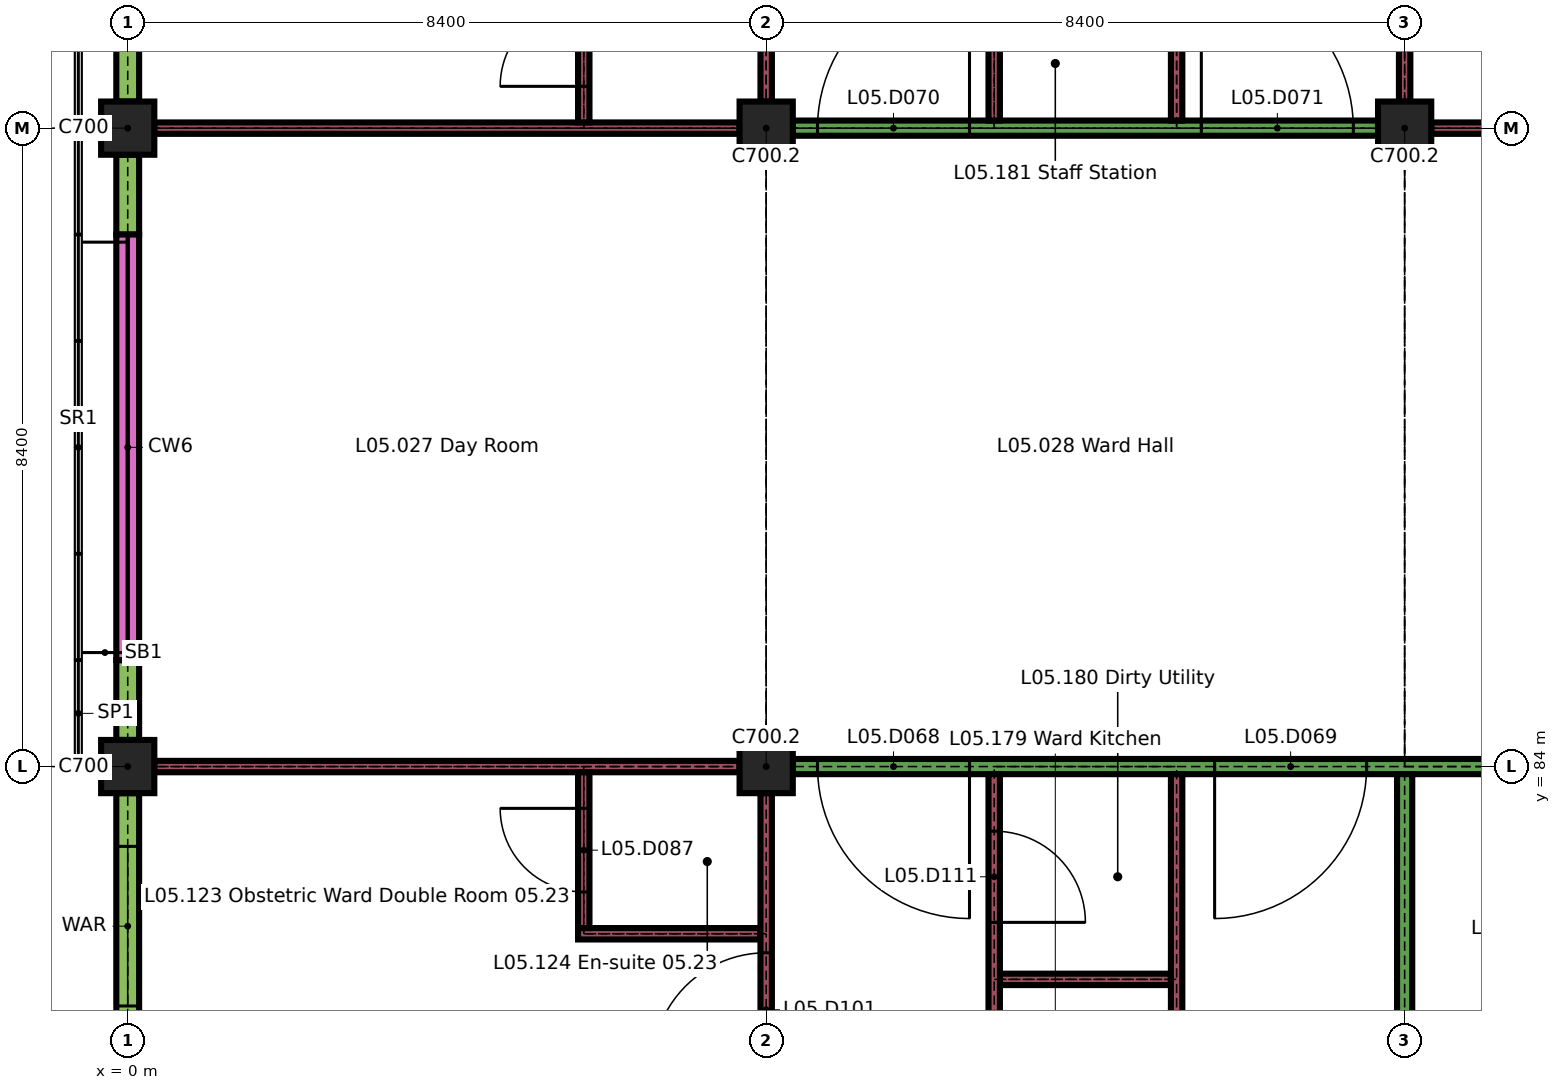
"""IFC4 building model, lengths in metres.
Left out: names, types, materials, properties, quantities, classifications, styles, units other than length and angle.
Written with IfcOpenShell. Run it as: python <this file> out.ifc"""

import sys

from ifc_helpers import new_model, si_unit, direction, frame, frame_2d, origin, origin_2d, place, context, subcontext, project, spatial, rectangle, extrude, element, fill, save


model = new_model("IFC4")
c1 = context("Model", 3, precision=1e-05, world=origin(), true_north=direction((0.0, 1.0)))
c2 = subcontext(c1, "Body", "Model", "MODEL_VIEW")
j1 = project(units=[si_unit("LENGTHUNIT", "METRE"), si_unit("PLANEANGLEUNIT", "RADIAN")], contexts=[c1])
p1 = place(None, origin())
s1 = spatial("IfcSite", under=j1, at=p1, CompositionType="ELEMENT")
p2 = place(p1, origin())
s2 = spatial("IfcBuilding", under=s1, at=p2, CompositionType="ELEMENT")
p3 = place(p2, frame((0.0, 0.0, 22.5)))
s3 = spatial("IfcBuildingStorey", under=s2, at=p3, CompositionType="ELEMENT", Elevation=22.5)
for number, where, z_axis, x_axis in (
    (1, (0.0, 84.0, 0.0), (0.0, 0.0, 1.0), (1.0, 0.0, 0.0)),
    (2, (8.4, 84.0, 0.0), (0.0, 0.0, 1.0), (1.0, 0.0, 0.0)),
    (3, (0.0, 92.4, 0.0), (0.0, 0.0, 1.0), (1.0, 0.0, 0.0)),
    (4, (8.4, 92.4, 0.0), (0.0, 0.0, 1.0), (1.0, 0.0, 0.0)),
    (5, (16.8, 92.4, 0.0), (0.0, 0.0, 1.0), (1.0, 0.0, 0.0)),
):
    element("IfcColumn", number, at=place(p3, frame(where, z_axis=z_axis, x_axis=x_axis)), inside=s3, PredefinedType="COLUMN", context=c2, shape_type="SweptSolid", body=[
        extrude(rectangle(XDim=0.7, YDim=0.7, at=origin_2d()), origin(), (0.0, 0.0, 1.0), 3.26),
    ])
p4 = place(p3, frame((0.0, 79.8, 0.0), z_axis=(0.0, 0.0, 1.0), x_axis=(0.0, 1.0, 0.0)))
e6 = element("IfcWall", 6, at=p4, inside=s3, PredefinedType="SOLIDWALL", context=c2, shape_type="SweptSolid", body=[
    extrude(rectangle(XDim=3.85, YDim=0.3, at=frame_2d((1.925, 0.0))), origin(), (0.0, 0.0, 1.0), 2.96),
])
p5 = place(p4, frame((1.05, 0.0, 0.9)))
e7 = element("IfcOpeningElement", 7, at=p5, cuts=e6, PredefinedType="OPENING", context=c2, shape_type="SweptSolid", body=[
    extrude(rectangle(XDim=2.1, YDim=1.5, at=frame_2d((1.05, 0.75))), frame((0.0, 0.16, 0.0), z_axis=(0.0, -1.0, 0.0), x_axis=(1.0, 0.0, 0.0)), (0.0, 0.0, 1.0), 0.32),
])
p6 = place(p3, frame((0.0, 84.35, 0.0), z_axis=(0.0, 0.0, 1.0), x_axis=(0.0, 1.0, 0.0)))
e8 = element("IfcWall", 8, at=p6, inside=s3, PredefinedType="SOLIDWALL", context=c2, shape_type="SweptSolid", body=[
    extrude(rectangle(XDim=1.05, YDim=0.3, at=frame_2d((0.525, 0.0))), origin(), (0.0, 0.0, 1.0), 2.96),
])
p7 = place(p3, frame((0.0, 91.0, 0.0), z_axis=(0.0, 0.0, 1.0), x_axis=(0.0, 1.0, 0.0)))
e9 = element("IfcWall", 9, at=p7, inside=s3, PredefinedType="SOLIDWALL", context=c2, shape_type="SweptSolid", body=[
    extrude(rectangle(XDim=1.05, YDim=0.3, at=frame_2d((0.525, 0.0))), origin(), (0.0, 0.0, 1.0), 2.96),
])
p8 = place(p3, frame((0.0, 85.4, 0.0), z_axis=(0.0, 0.0, 1.0), x_axis=(0.0, 1.0, 0.0)))
e10 = element("IfcWall", 10, at=p8, inside=s3, PredefinedType="SOLIDWALL", context=c2, shape_type="SweptSolid", body=[
    extrude(rectangle(XDim=5.6, YDim=0.3, at=frame_2d((2.8, 0.0))), origin(), (0.0, 0.0, 1.0), 0.6),
])
p9 = place(p3, frame((0.0, 92.75, 0.0), z_axis=(0.0, 0.0, 1.0), x_axis=(0.0, 1.0, 0.0)))
e11 = element("IfcWall", 11, at=p9, inside=s3, PredefinedType="SOLIDWALL", context=c2, shape_type="SweptSolid", body=[
    extrude(rectangle(XDim=3.85, YDim=0.3, at=frame_2d((1.925, 0.0))), origin(), (0.0, 0.0, 1.0), 2.96),
])
p10 = place(p9, frame((0.7, 0.0, 0.9)))
e12 = element("IfcOpeningElement", 12, at=p10, cuts=e11, PredefinedType="OPENING", context=c2, shape_type="SweptSolid", body=[
    extrude(rectangle(XDim=2.1, YDim=1.5, at=frame_2d((1.05, 0.75))), frame((0.0, 0.16, 0.0), z_axis=(0.0, -1.0, 0.0), x_axis=(1.0, 0.0, 0.0)), (0.0, 0.0, 1.0), 0.32),
])
p11 = place(p3, frame((11.475, 81.2, 0.0), z_axis=(0.0, 0.0, 1.0), x_axis=(1.0, 0.0, 0.0)))
e13 = element("IfcWall", 13, at=p11, inside=s3, PredefinedType="PARTITIONING", context=c2, shape_type="SweptSolid", body=[
    extrude(rectangle(XDim=2.25, YDim=0.15, at=frame_2d((1.125, 0.0))), origin(), (0.0, 0.0, 1.0), 3.26),
])
p12 = place(p3, frame((5.925, 81.8, 0.0), z_axis=(0.0, 0.0, 1.0), x_axis=(1.0, 0.0, 0.0)))
e14 = element("IfcWall", 14, at=p12, inside=s3, PredefinedType="PARTITIONING", context=c2, shape_type="SweptSolid", body=[
    extrude(rectangle(XDim=2.4, YDim=0.15, at=frame_2d((1.2, 0.0))), origin(), (0.0, 0.0, 1.0), 3.26),
])
p13 = place(p3, frame((0.35, 84.0, 0.0), z_axis=(0.0, 0.0, 1.0), x_axis=(1.0, 0.0, 0.0)))
e15 = element("IfcWall", 15, at=p13, inside=s3, PredefinedType="PARTITIONING", context=c2, shape_type="SweptSolid", body=[
    extrude(rectangle(XDim=7.7, YDim=0.15, at=frame_2d((3.85, 0.0))), origin(), (0.0, 0.0, 1.0), 3.26),
])
p14 = place(p3, frame((8.75, 84.0, 0.0), z_axis=(0.0, 0.0, 1.0), x_axis=(1.0, 0.0, 0.0)))
e16 = element("IfcWall", 16, at=p14, inside=s3, PredefinedType="PARTITIONING", context=c2, shape_type="SweptSolid", body=[
    extrude(rectangle(XDim=12.85, YDim=0.2, at=frame_2d((6.425, 0.0))), origin(), (0.0, 0.0, 1.0), 3.26),
])
p15 = place(p14, frame((0.325, 0.0, 0.0)))
e17 = element("IfcOpeningElement", 17, at=p15, cuts=e16, PredefinedType="OPENING", context=c2, shape_type="SweptSolid", body=[
    extrude(rectangle(XDim=2.0, YDim=2.4, at=frame_2d((1.0, 1.2))), frame((0.0, 0.11, 0.0), z_axis=(0.0, -1.0, 0.0), x_axis=(1.0, 0.0, 0.0)), (0.0, 0.0, 1.0), 0.22),
])
p16 = place(p14, frame((5.55, 0.0, 0.0)))
e18 = element("IfcOpeningElement", 18, at=p16, cuts=e16, PredefinedType="OPENING", context=c2, shape_type="SweptSolid", body=[
    extrude(rectangle(XDim=2.0, YDim=2.4, at=frame_2d((1.0, 1.2))), frame((0.0, 0.11, 0.0), z_axis=(0.0, -1.0, 0.0), x_axis=(1.0, 0.0, 0.0)), (0.0, 0.0, 1.0), 0.22),
])
p17 = place(p3, frame((0.35, 92.4, 0.0), z_axis=(0.0, 0.0, 1.0), x_axis=(1.0, 0.0, 0.0)))
e19 = element("IfcWall", 19, at=p17, inside=s3, PredefinedType="PARTITIONING", context=c2, shape_type="SweptSolid", body=[
    extrude(rectangle(XDim=7.7, YDim=0.15, at=frame_2d((3.85, 0.0))), origin(), (0.0, 0.0, 1.0), 3.26),
])
p18 = place(p3, frame((8.75, 92.4, 0.0), z_axis=(0.0, 0.0, 1.0), x_axis=(1.0, 0.0, 0.0)))
e20 = element("IfcWall", 20, at=p18, inside=s3, PredefinedType="PARTITIONING", context=c2, shape_type="SweptSolid", body=[
    extrude(rectangle(XDim=7.7, YDim=0.2, at=frame_2d((3.85, 0.0))), origin(), (0.0, 0.0, 1.0), 3.26),
])
p19 = place(p18, frame((0.325, 0.0, 0.0)))
e21 = element("IfcOpeningElement", 21, at=p19, cuts=e20, PredefinedType="OPENING", context=c2, shape_type="SweptSolid", body=[
    extrude(rectangle(XDim=2.0, YDim=2.4, at=frame_2d((1.0, 1.2))), frame((0.0, 0.11, 0.0), z_axis=(0.0, -1.0, 0.0), x_axis=(1.0, 0.0, 0.0)), (0.0, 0.0, 1.0), 0.22),
])
p20 = place(p18, frame((5.375, 0.0, 0.0)))
e22 = element("IfcOpeningElement", 22, at=p20, cuts=e20, PredefinedType="OPENING", context=c2, shape_type="SweptSolid", body=[
    extrude(rectangle(XDim=2.0, YDim=2.4, at=frame_2d((1.0, 1.2))), frame((0.0, 0.11, 0.0), z_axis=(0.0, -1.0, 0.0), x_axis=(1.0, 0.0, 0.0)), (0.0, 0.0, 1.0), 0.22),
])
p21 = place(p3, frame((17.15, 92.4, 0.0), z_axis=(0.0, 0.0, 1.0), x_axis=(1.0, 0.0, 0.0)))
e23 = element("IfcWall", 23, at=p21, inside=s3, PredefinedType="PARTITIONING", context=c2, shape_type="SweptSolid", body=[
    extrude(rectangle(XDim=7.7, YDim=0.15, at=frame_2d((3.85, 0.0))), origin(), (0.0, 0.0, 1.0), 3.26),
])
p22 = place(p3, frame((6.0, 81.875, 0.0), z_axis=(0.0, 0.0, 1.0), x_axis=(0.0, 1.0, 0.0)))
e24 = element("IfcWall", 24, at=p22, inside=s3, PredefinedType="PARTITIONING", context=c2, shape_type="SweptSolid", body=[
    extrude(rectangle(XDim=2.05, YDim=0.15, at=frame_2d((1.025, 0.0))), origin(), (0.0, 0.0, 1.0), 3.26),
])
p23 = place(p22, frame((0.475, 0.0, 0.0)))
e25 = element("IfcOpeningElement", 25, at=p23, cuts=e24, PredefinedType="OPENING", context=c2, shape_type="SweptSolid", body=[
    extrude(rectangle(XDim=1.1, YDim=2.1, at=frame_2d((0.55, 1.05))), frame((0.0, 0.085, 0.0), z_axis=(0.0, -1.0, 0.0), x_axis=(1.0, 0.0, 0.0)), (0.0, 0.0, 1.0), 0.17),
])
p24 = place(p3, frame((6.0, 92.475, 0.0), z_axis=(0.0, 0.0, 1.0), x_axis=(0.0, 1.0, 0.0)))
e26 = element("IfcWall", 26, at=p24, inside=s3, PredefinedType="PARTITIONING", context=c2, shape_type="SweptSolid", body=[
    extrude(rectangle(XDim=2.05, YDim=0.15, at=frame_2d((1.025, 0.0))), origin(), (0.0, 0.0, 1.0), 3.26),
])
p25 = place(p24, frame((0.475, 0.0, 0.0)))
e27 = element("IfcOpeningElement", 27, at=p25, cuts=e26, PredefinedType="OPENING", context=c2, shape_type="SweptSolid", body=[
    extrude(rectangle(XDim=1.1, YDim=2.1, at=frame_2d((0.55, 1.05))), frame((0.0, 0.085, 0.0), z_axis=(0.0, -1.0, 0.0), x_axis=(1.0, 0.0, 0.0)), (0.0, 0.0, 1.0), 0.17),
])
p26 = place(p3, frame((8.4, 75.6, 0.0), z_axis=(0.0, 0.0, 1.0), x_axis=(0.0, 1.0, 0.0)))
e28 = element("IfcWall", 28, at=p26, inside=s3, PredefinedType="PARTITIONING", context=c2, shape_type="SweptSolid", body=[
    extrude(rectangle(XDim=8.05, YDim=0.15, at=frame_2d((4.025, 0.0))), origin(), (0.0, 0.0, 1.0), 3.26),
])
p27 = place(p26, frame((2.45, 0.0, 0.0)))
e29 = element("IfcOpeningElement", 29, at=p27, cuts=e28, PredefinedType="OPENING", context=c2, shape_type="SweptSolid", body=[
    extrude(rectangle(XDim=1.5, YDim=2.4, at=frame_2d((0.75, 1.2))), frame((0.0, 0.085, 0.0), z_axis=(0.0, -1.0, 0.0), x_axis=(1.0, 0.0, 0.0)), (0.0, 0.0, 1.0), 0.17),
])
p28 = place(p26, frame((4.45, 0.0, 0.0)))
e30 = element("IfcOpeningElement", 30, at=p28, cuts=e28, PredefinedType="OPENING", context=c2, shape_type="SweptSolid", body=[
    extrude(rectangle(XDim=1.5, YDim=2.4, at=frame_2d((0.75, 1.2))), frame((0.0, 0.085, 0.0), z_axis=(0.0, -1.0, 0.0), x_axis=(1.0, 0.0, 0.0)), (0.0, 0.0, 1.0), 0.17),
])
p29 = place(p3, frame((8.4, 92.75, 0.0), z_axis=(0.0, 0.0, 1.0), x_axis=(0.0, 1.0, 0.0)))
e31 = element("IfcWall", 31, at=p29, inside=s3, PredefinedType="PARTITIONING", context=c2, shape_type="SweptSolid", body=[
    extrude(rectangle(XDim=7.7, YDim=0.15, at=frame_2d((3.85, 0.0))), origin(), (0.0, 0.0, 1.0), 3.26),
])
p30 = place(p29, frame((2.1, 0.0, 0.0)))
e32 = element("IfcOpeningElement", 32, at=p30, cuts=e31, PredefinedType="OPENING", context=c2, shape_type="SweptSolid", body=[
    extrude(rectangle(XDim=1.5, YDim=2.4, at=frame_2d((0.75, 1.2))), frame((0.0, 0.085, 0.0), z_axis=(0.0, -1.0, 0.0), x_axis=(1.0, 0.0, 0.0)), (0.0, 0.0, 1.0), 0.17),
])
p31 = place(p29, frame((4.1, 0.0, 0.0)))
e33 = element("IfcOpeningElement", 33, at=p31, cuts=e31, PredefinedType="OPENING", context=c2, shape_type="SweptSolid", body=[
    extrude(rectangle(XDim=1.5, YDim=2.4, at=frame_2d((0.75, 1.2))), frame((0.0, 0.085, 0.0), z_axis=(0.0, -1.0, 0.0), x_axis=(1.0, 0.0, 0.0)), (0.0, 0.0, 1.0), 0.17),
])
p32 = place(p3, frame((11.4, 77.075, 0.0), z_axis=(0.0, 0.0, 1.0), x_axis=(0.0, 1.0, 0.0)))
e34 = element("IfcWall", 34, at=p32, inside=s3, PredefinedType="PARTITIONING", context=c2, shape_type="SweptSolid", body=[
    extrude(rectangle(XDim=6.825, YDim=0.15, at=frame_2d((3.413, 0.0))), origin(), (0.0, 0.0, 1.0), 3.26),
])
p33 = place(p32, frame((4.875, 0.0, 0.0)))
e35 = element("IfcOpeningElement", 35, at=p33, cuts=e34, PredefinedType="OPENING", context=c2, shape_type="SweptSolid", body=[
    extrude(rectangle(XDim=1.2, YDim=2.1, at=frame_2d((0.6, 1.05))), frame((0.0, 0.085, 0.0), z_axis=(0.0, -1.0, 0.0), x_axis=(1.0, 0.0, 0.0)), (0.0, 0.0, 1.0), 0.17),
])
p34 = place(p3, frame((11.4, 92.5, 0.0), z_axis=(0.0, 0.0, 1.0), x_axis=(0.0, 1.0, 0.0)))
e36 = element("IfcWall", 36, at=p34, inside=s3, PredefinedType="PARTITIONING", context=c2, shape_type="SweptSolid", body=[
    extrude(rectangle(XDim=13.625, YDim=0.15, at=frame_2d((6.812, 0.0))), origin(), (0.0, 0.0, 1.0), 3.26),
])
p35 = place(p3, frame((13.8, 42.1, 0.0), z_axis=(0.0, 0.0, 1.0), x_axis=(0.0, 1.0, 0.0)))
e37 = element("IfcWall", 37, at=p35, inside=s3, PredefinedType="PARTITIONING", context=c2, shape_type="SweptSolid", body=[
    extrude(rectangle(XDim=41.8, YDim=0.15, at=frame_2d((20.9, 0.0))), origin(), (0.0, 0.0, 1.0), 3.26),
])
p36 = place(p35, frame((9.85, 0.0, 0.0)))
e38 = element("IfcOpeningElement", 38, at=p36, cuts=e37, PredefinedType="OPENING", context=c2, shape_type="SweptSolid", body=[
    extrude(rectangle(XDim=1.1, YDim=2.1, at=frame_2d((0.55, 1.05))), frame((0.0, 0.085, 0.0), z_axis=(0.0, -1.0, 0.0), x_axis=(1.0, 0.0, 0.0)), (0.0, 0.0, 1.0), 0.17),
])
p37 = place(p35, frame((24.65, 0.0, 0.0)))
e39 = element("IfcOpeningElement", 39, at=p37, cuts=e37, PredefinedType="OPENING", context=c2, shape_type="SweptSolid", body=[
    extrude(rectangle(XDim=0.9, YDim=2.1, at=frame_2d((0.45, 1.05))), frame((0.0, 0.085, 0.0), z_axis=(0.0, -1.0, 0.0), x_axis=(1.0, 0.0, 0.0)), (0.0, 0.0, 1.0), 0.17),
])
p38 = place(p35, frame((36.45, 0.0, 0.0)))
e40 = element("IfcOpeningElement", 40, at=p38, cuts=e37, PredefinedType="OPENING", context=c2, shape_type="SweptSolid", body=[
    extrude(rectangle(XDim=1.1, YDim=2.1, at=frame_2d((0.55, 1.05))), frame((0.0, 0.085, 0.0), z_axis=(0.0, -1.0, 0.0), x_axis=(1.0, 0.0, 0.0)), (0.0, 0.0, 1.0), 0.17),
])
p39 = place(p3, frame((13.8, 92.5, 0.0), z_axis=(0.0, 0.0, 1.0), x_axis=(0.0, 1.0, 0.0)))
e41 = element("IfcWall", 41, at=p39, inside=s3, PredefinedType="PARTITIONING", context=c2, shape_type="SweptSolid", body=[
    extrude(rectangle(XDim=13.625, YDim=0.15, at=frame_2d((6.812, 0.0))), origin(), (0.0, 0.0, 1.0), 3.26),
])
p40 = place(p39, frame((1.5, 0.0, 0.0)))
e42 = element("IfcOpeningElement", 42, at=p40, cuts=e41, PredefinedType="OPENING", context=c2, shape_type="SweptSolid", body=[
    extrude(rectangle(XDim=1.1, YDim=2.1, at=frame_2d((0.55, 1.05))), frame((0.0, 0.085, 0.0), z_axis=(0.0, -1.0, 0.0), x_axis=(1.0, 0.0, 0.0)), (0.0, 0.0, 1.0), 0.17),
])
p41 = place(p39, frame((5.6, 0.0, 0.0)))
e43 = element("IfcOpeningElement", 43, at=p41, cuts=e41, PredefinedType="OPENING", context=c2, shape_type="SweptSolid", body=[
    extrude(rectangle(XDim=1.2, YDim=2.1, at=frame_2d((0.6, 1.05))), frame((0.0, 0.085, 0.0), z_axis=(0.0, -1.0, 0.0), x_axis=(1.0, 0.0, 0.0)), (0.0, 0.0, 1.0), 0.17),
])
p42 = place(p39, frame((10.363, 0.0, 0.0)))
e44 = element("IfcOpeningElement", 44, at=p42, cuts=e41, PredefinedType="OPENING", context=c2, shape_type="SweptSolid", body=[
    extrude(rectangle(XDim=1.2, YDim=2.1, at=frame_2d((0.6, 1.05))), frame((0.0, 0.085, 0.0), z_axis=(0.0, -1.0, 0.0), x_axis=(1.0, 0.0, 0.0)), (0.0, 0.0, 1.0), 0.17),
])
p43 = place(p3, frame((16.8, 75.6, 0.0), z_axis=(0.0, 0.0, 1.0), x_axis=(0.0, 1.0, 0.0)))
e45 = element("IfcWall", 45, at=p43, inside=s3, PredefinedType="PARTITIONING", context=c2, shape_type="SweptSolid", body=[
    extrude(rectangle(XDim=8.3, YDim=0.2, at=frame_2d((4.15, 0.0))), origin(), (0.0, 0.0, 1.0), 3.26),
])
p44 = place(p43, frame((3.15, 0.0, 0.0)))
e46 = element("IfcOpeningElement", 46, at=p44, cuts=e45, PredefinedType="OPENING", context=c2, shape_type="SweptSolid", body=[
    extrude(rectangle(XDim=2.0, YDim=2.4, at=frame_2d((1.0, 1.2))), frame((0.0, 0.11, 0.0), z_axis=(0.0, -1.0, 0.0), x_axis=(1.0, 0.0, 0.0)), (0.0, 0.0, 1.0), 0.22),
])
p45 = place(p3, frame((16.8, 92.75, 0.0), z_axis=(0.0, 0.0, 1.0), x_axis=(0.0, 1.0, 0.0)))
e47 = element("IfcWall", 47, at=p45, inside=s3, PredefinedType="PARTITIONING", context=c2, shape_type="SweptSolid", body=[
    extrude(rectangle(XDim=7.7, YDim=0.15, at=frame_2d((3.85, 0.0))), origin(), (0.0, 0.0, 1.0), 3.26),
])
p46 = place(p45, frame((2.1, 0.0, 0.0)))
e48 = element("IfcOpeningElement", 48, at=p46, cuts=e47, PredefinedType="OPENING", context=c2, shape_type="SweptSolid", body=[
    extrude(rectangle(XDim=1.5, YDim=2.4, at=frame_2d((0.75, 1.2))), frame((0.0, 0.085, 0.0), z_axis=(0.0, -1.0, 0.0), x_axis=(1.0, 0.0, 0.0)), (0.0, 0.0, 1.0), 0.17),
])
p47 = place(p45, frame((4.1, 0.0, 0.0)))
e49 = element("IfcOpeningElement", 49, at=p47, cuts=e47, PredefinedType="OPENING", context=c2, shape_type="SweptSolid", body=[
    extrude(rectangle(XDim=1.5, YDim=2.4, at=frame_2d((0.75, 1.2))), frame((0.0, 0.085, 0.0), z_axis=(0.0, -1.0, 0.0), x_axis=(1.0, 0.0, 0.0)), (0.0, 0.0, 1.0), 0.17),
])
p48 = place(p5, origin())
e50 = element("IfcWindow", 50, at=p48, inside=s3, PartitioningType="DOUBLE_PANEL_VERTICAL", PredefinedType="WINDOW", context=c2, shape_type="SweptSolid", body=[
    extrude(rectangle(XDim=2.1, YDim=1.5, at=frame_2d((1.05, 0.75))), frame((0.0, 0.05, 0.0), z_axis=(0.0, -1.0, 0.0), x_axis=(1.0, 0.0, 0.0)), (0.0, 0.0, 1.0), 0.1),
])
fill(e7, e50)
p49 = place(p15, origin())
e51 = element("IfcDoor", 51, at=p49, inside=s3, OperationType="SINGLE_SWING_RIGHT", PredefinedType="DOOR", context=c2, shape_type="SweptSolid", body=[
    extrude(rectangle(XDim=2.0, YDim=2.4, at=frame_2d((1.0, 1.2))), frame((0.0, 0.03, 0.0), z_axis=(0.0, -1.0, 0.0), x_axis=(1.0, 0.0, 0.0)), (0.0, 0.0, 1.0), 0.06),
])
fill(e17, e51)
p50 = place(p16, origin())
e52 = element("IfcDoor", 52, at=p50, inside=s3, OperationType="SINGLE_SWING_LEFT", PredefinedType="DOOR", context=c2, shape_type="SweptSolid", body=[
    extrude(rectangle(XDim=2.0, YDim=2.4, at=frame_2d((1.0, 1.2))), frame((0.0, 0.03, 0.0), z_axis=(0.0, -1.0, 0.0), x_axis=(1.0, 0.0, 0.0)), (0.0, 0.0, 1.0), 0.06),
])
fill(e18, e52)
p51 = place(p19, origin())
e53 = element("IfcDoor", 53, at=p51, inside=s3, OperationType="SINGLE_SWING_LEFT", PredefinedType="DOOR", context=c2, shape_type="SweptSolid", body=[
    extrude(rectangle(XDim=2.0, YDim=2.4, at=frame_2d((1.0, 1.2))), frame((0.0, 0.03, 0.0), z_axis=(0.0, -1.0, 0.0), x_axis=(1.0, 0.0, 0.0)), (0.0, 0.0, 1.0), 0.06),
])
fill(e21, e53)
p52 = place(p20, origin())
e54 = element("IfcDoor", 54, at=p52, inside=s3, OperationType="SINGLE_SWING_RIGHT", PredefinedType="DOOR", context=c2, shape_type="SweptSolid", body=[
    extrude(rectangle(XDim=2.0, YDim=2.4, at=frame_2d((1.0, 1.2))), frame((0.0, 0.03, 0.0), z_axis=(0.0, -1.0, 0.0), x_axis=(1.0, 0.0, 0.0)), (0.0, 0.0, 1.0), 0.06),
])
fill(e22, e54)
p53 = place(p23, origin())
e55 = element("IfcDoor", 55, at=p53, inside=s3, OperationType="SINGLE_SWING_LEFT", PredefinedType="DOOR", context=c2, shape_type="SweptSolid", body=[
    extrude(rectangle(XDim=1.1, YDim=2.1, at=frame_2d((0.55, 1.05))), frame((0.0, 0.025, 0.0), z_axis=(0.0, -1.0, 0.0), x_axis=(1.0, 0.0, 0.0)), (0.0, 0.0, 1.0), 0.05),
])
fill(e25, e55)
p54 = place(p25, origin())
e56 = element("IfcDoor", 56, at=p54, inside=s3, OperationType="SINGLE_SWING_RIGHT", PredefinedType="DOOR", context=c2, shape_type="SweptSolid", body=[
    extrude(rectangle(XDim=1.1, YDim=2.1, at=frame_2d((0.55, 1.05))), frame((0.0, 0.025, 0.0), z_axis=(0.0, -1.0, 0.0), x_axis=(1.0, 0.0, 0.0)), (0.0, 0.0, 1.0), 0.05),
])
fill(e27, e56)
p55 = place(p28, origin())
e57 = element("IfcDoor", 57, at=p55, inside=s3, OperationType="SINGLE_SWING_RIGHT", PredefinedType="DOOR", context=c2, shape_type="SweptSolid", body=[
    extrude(rectangle(XDim=1.5, YDim=2.4, at=frame_2d((0.75, 1.2))), frame((0.0, 0.03, 0.0), z_axis=(0.0, -1.0, 0.0), x_axis=(1.0, 0.0, 0.0)), (0.0, 0.0, 1.0), 0.06),
])
fill(e30, e57)
p56 = place(p33, origin())
e58 = element("IfcDoor", 58, at=p56, inside=s3, OperationType="SINGLE_SWING_LEFT", PredefinedType="DOOR", context=c2, shape_type="SweptSolid", body=[
    extrude(rectangle(XDim=1.2, YDim=2.1, at=frame_2d((0.6, 1.05))), frame((0.0, 0.025, 0.0), z_axis=(0.0, -1.0, 0.0), x_axis=(1.0, 0.0, 0.0)), (0.0, 0.0, 1.0), 0.05),
])
fill(e35, e58)
save(model, sys.argv[1])
